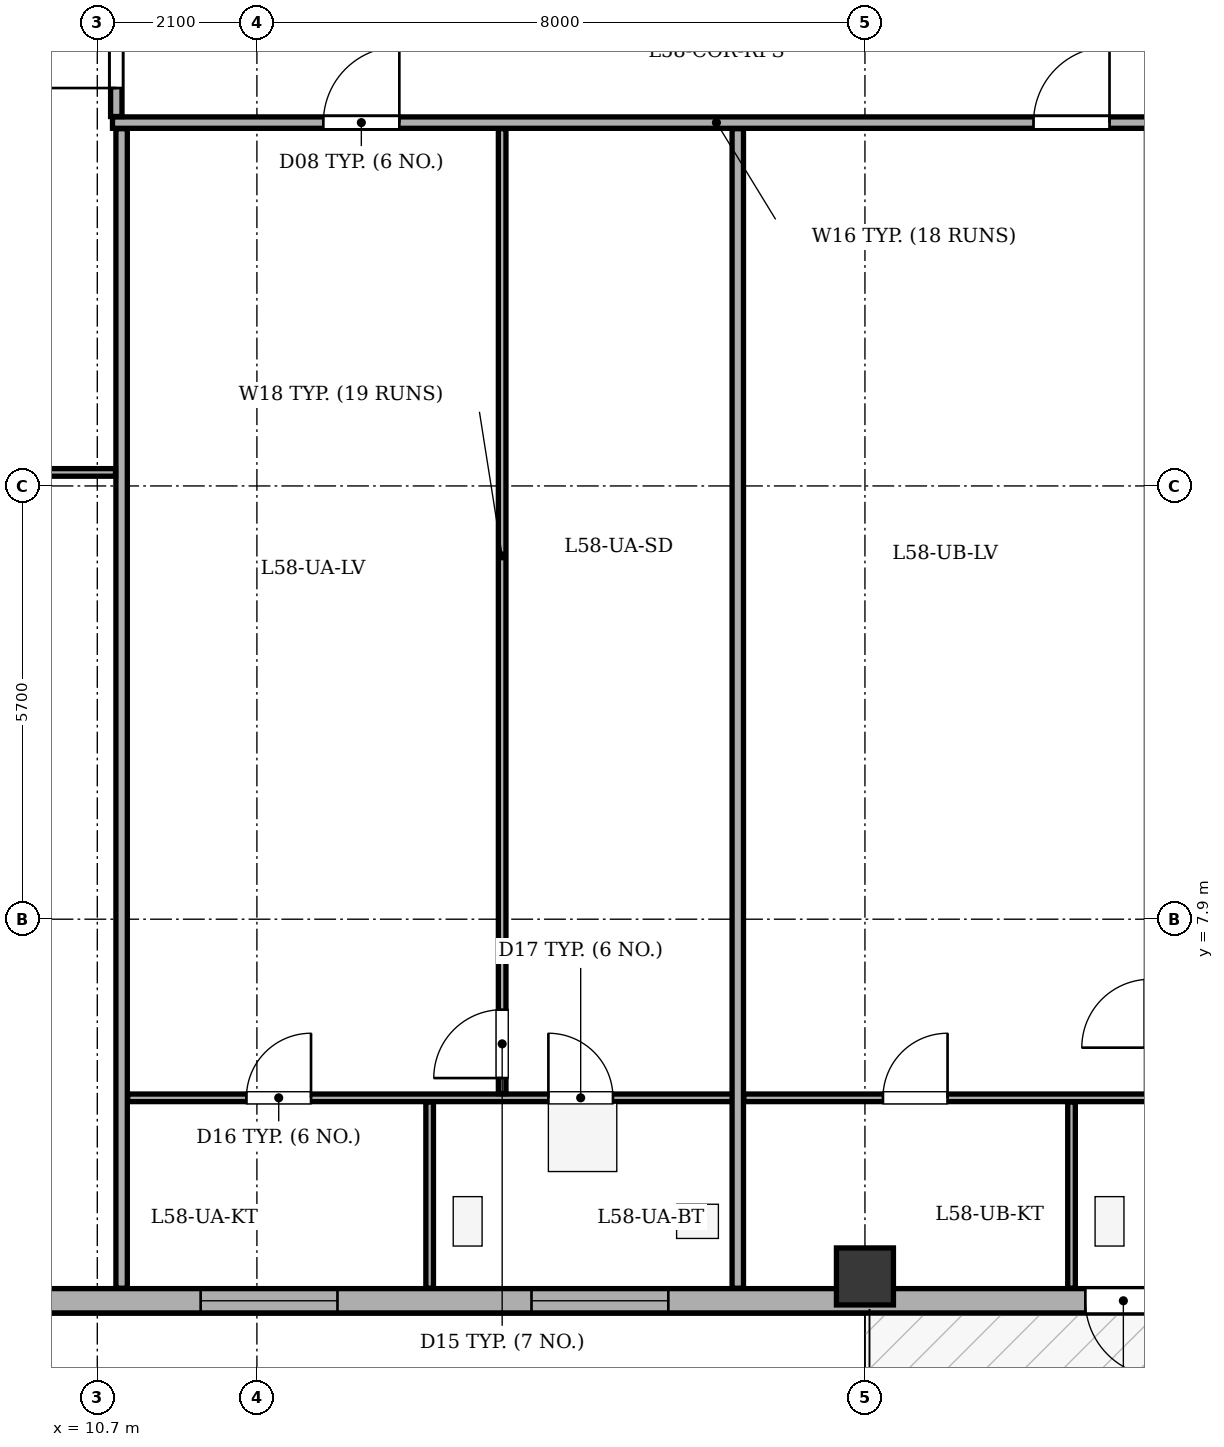
"""IFC4 building model, lengths in metres.
Left out: names, types, materials, properties, quantities, classifications, styles, units other than length and angle.
Written with IfcOpenShell. Run it as: python <this file> out.ifc"""

import sys

from ifc_helpers import new_model, si_unit, direction, frame, frame_2d, origin, origin_2d, place, context, subcontext, project, spatial, rectangle, extrude, element, fill, save


model = new_model("IFC4")
c1 = context("Model", 3, precision=1e-05, world=origin(), true_north=direction((0.0, 1.0)))
c2 = subcontext(c1, "Body", "Model", "MODEL_VIEW")
j1 = project(units=[si_unit("LENGTHUNIT", "METRE"), si_unit("PLANEANGLEUNIT", "RADIAN")], contexts=[c1])
p1 = place(None, origin())
s1 = spatial("IfcSite", under=j1, at=p1, CompositionType="ELEMENT")
p2 = place(p1, origin())
s2 = spatial("IfcBuilding", under=s1, at=p2, CompositionType="ELEMENT")
p3 = place(p2, frame((0.0, 0.0, 224.5)))
s3 = spatial("IfcBuildingStorey", under=s2, at=p3, CompositionType="ELEMENT", Elevation=224.5)
p4 = place(p3, frame((20.8, 3.2, 0.0), z_axis=(0.0, 0.0, 1.0), x_axis=(1.0, 0.0, 0.0)))
e1 = element("IfcColumn", 1, at=p4, inside=s3, PredefinedType="COLUMN", context=c2, shape_type="SweptSolid", body=[
    extrude(rectangle(XDim=0.75, YDim=0.75, at=origin_2d()), origin(), (0.0, 0.0, 1.0), 3.4),
])
p5 = place(p3, frame((44.8, 2.88, 0.0), z_axis=(0.0, 0.0, 1.0), x_axis=(-1.0, 0.0, 0.0)))
e2 = element("IfcWall", 2, at=p5, inside=s3, PredefinedType="STANDARD", context=c2, shape_type="SweptSolid", body=[
    extrude(rectangle(XDim=36.0, YDim=0.32, at=frame_2d((18.0, 0.0))), origin(), (0.0, 0.0, 1.0), 2.335),
])
p6 = place(p5, frame((20.1, 0.0, 0.0)))
e3 = element("IfcOpeningElement", 3, at=p6, cuts=e2, PredefinedType="OPENING", context=c2, shape_type="SweptSolid", body=[
    extrude(rectangle(XDim=1.0, YDim=2.02, at=frame_2d((0.5, 1.01))), frame((0.0, 0.17, 0.0), z_axis=(0.0, -1.0, 0.0), x_axis=(1.0, 0.0, 0.0)), (0.0, 0.0, 1.0), 0.34),
])
p7 = place(p5, frame((1.227, 0.0, 0.75)))
e4 = element("IfcOpeningElement", 4, at=p7, cuts=e2, PredefinedType="OPENING", context=c2, shape_type="SweptSolid", body=[
    extrude(rectangle(XDim=1.8, YDim=1.465, at=frame_2d((0.9, 0.732))), frame((0.0, 0.17, 0.0), z_axis=(0.0, -1.0, 0.0), x_axis=(1.0, 0.0, 0.0)), (0.0, 0.0, 1.0), 0.34),
])
p8 = place(p5, frame((5.18, 0.0, 0.75)))
e5 = element("IfcOpeningElement", 5, at=p8, cuts=e2, PredefinedType="OPENING", context=c2, shape_type="SweptSolid", body=[
    extrude(rectangle(XDim=1.8, YDim=1.465, at=frame_2d((0.9, 0.732))), frame((0.0, 0.17, 0.0), z_axis=(0.0, -1.0, 0.0), x_axis=(1.0, 0.0, 0.0)), (0.0, 0.0, 1.0), 0.34),
])
p9 = place(p5, frame((12.548, 0.0, 0.75)))
e6 = element("IfcOpeningElement", 6, at=p9, cuts=e2, PredefinedType="OPENING", context=c2, shape_type="SweptSolid", body=[
    extrude(rectangle(XDim=1.25, YDim=1.465, at=frame_2d((0.625, 0.732))), frame((0.0, 0.17, 0.0), z_axis=(0.0, -1.0, 0.0), x_axis=(1.0, 0.0, 0.0)), (0.0, 0.0, 1.0), 0.34),
])
p10 = place(p5, frame((26.587, 0.0, 0.75)))
e7 = element("IfcOpeningElement", 7, at=p10, cuts=e2, PredefinedType="OPENING", context=c2, shape_type="SweptSolid", body=[
    extrude(rectangle(XDim=1.8, YDim=1.465, at=frame_2d((0.9, 0.732))), frame((0.0, 0.17, 0.0), z_axis=(0.0, -1.0, 0.0), x_axis=(1.0, 0.0, 0.0)), (0.0, 0.0, 1.0), 0.34),
])
p11 = place(p5, frame((30.94, 0.0, 0.75)))
e8 = element("IfcOpeningElement", 8, at=p11, cuts=e2, PredefinedType="OPENING", context=c2, shape_type="SweptSolid", body=[
    extrude(rectangle(XDim=1.8, YDim=1.465, at=frame_2d((0.9, 0.732))), frame((0.0, 0.17, 0.0), z_axis=(0.0, -1.0, 0.0), x_axis=(1.0, 0.0, 0.0)), (0.0, 0.0, 1.0), 0.34),
])
p12 = place(p5, frame((10.33, 0.0, 0.75)))
e9 = element("IfcOpeningElement", 9, at=p12, cuts=e2, PredefinedType="OPENING", context=c2, shape_type="SweptSolid", body=[
    extrude(rectangle(XDim=0.75, YDim=1.45, at=frame_2d((0.375, 0.725))), frame((0.0, 0.17, 0.0), z_axis=(0.0, -1.0, 0.0), x_axis=(1.0, 0.0, 0.0)), (0.0, 0.0, 1.0), 0.34),
])
p13 = place(p3, frame((10.9, 18.38, 0.0), z_axis=(0.0, 0.0, 1.0), x_axis=(1.0, 0.0, 0.0)))
e10 = element("IfcWall", 10, at=p13, inside=s3, PredefinedType="PARTITIONING", context=c2, shape_type="SweptSolid", body=[
    extrude(rectangle(XDim=34.02, YDim=0.15, at=frame_2d((17.01, 0.0))), origin(), (0.0, 0.0, 1.0), 2.95),
])
p14 = place(p13, frame((2.774, 0.0, 0.0)))
e11 = element("IfcOpeningElement", 11, at=p14, cuts=e10, PredefinedType="OPENING", context=c2, shape_type="SweptSolid", body=[
    extrude(rectangle(XDim=1.0, YDim=2.1, at=frame_2d((0.5, 1.05))), frame((0.0, 0.085, 0.0), z_axis=(0.0, -1.0, 0.0), x_axis=(1.0, 0.0, 0.0)), (0.0, 0.0, 1.0), 0.17),
])
p15 = place(p13, frame((12.118, 0.0, 0.0)))
e12 = element("IfcOpeningElement", 12, at=p15, cuts=e10, PredefinedType="OPENING", context=c2, shape_type="SweptSolid", body=[
    extrude(rectangle(XDim=1.0, YDim=2.1, at=frame_2d((0.5, 1.05))), frame((0.0, 0.085, 0.0), z_axis=(0.0, -1.0, 0.0), x_axis=(1.0, 0.0, 0.0)), (0.0, 0.0, 1.0), 0.17),
])
p16 = place(p13, frame((20.901, 0.0, 0.0)))
e13 = element("IfcOpeningElement", 13, at=p16, cuts=e10, PredefinedType="OPENING", context=c2, shape_type="SweptSolid", body=[
    extrude(rectangle(XDim=1.0, YDim=2.1, at=frame_2d((0.5, 1.05))), frame((0.0, 0.085, 0.0), z_axis=(0.0, -1.0, 0.0), x_axis=(1.0, 0.0, 0.0)), (0.0, 0.0, 1.0), 0.17),
])
p17 = place(p13, frame((29.346, 0.0, 0.0)))
e14 = element("IfcOpeningElement", 14, at=p17, cuts=e10, PredefinedType="OPENING", context=c2, shape_type="SweptSolid", body=[
    extrude(rectangle(XDim=1.0, YDim=2.1, at=frame_2d((0.5, 1.05))), frame((0.0, 0.085, 0.0), z_axis=(0.0, -1.0, 0.0), x_axis=(1.0, 0.0, 0.0)), (0.0, 0.0, 1.0), 0.17),
])
p18 = place(p3, frame((11.02, 3.045, 0.0), z_axis=(0.0, 0.0, 1.0), x_axis=(0.0, 1.0, 0.0)))
e15 = element("IfcWall", 15, at=p18, inside=s3, PredefinedType="PARTITIONING", context=c2, shape_type="SweptSolid", body=[
    extrude(rectangle(XDim=15.255, YDim=0.15, at=frame_2d((7.627, 0.0))), origin(), (0.0, 0.0, 1.0), 2.335),
])
p19 = place(p3, frame((11.1, 5.55, 0.0), z_axis=(0.0, 0.0, 1.0), x_axis=(1.0, 0.0, 0.0)))
e16 = element("IfcWall", 16, at=p19, inside=s3, PredefinedType="PARTITIONING", context=c2, shape_type="SweptSolid", body=[
    extrude(rectangle(XDim=8.067, YDim=0.1, at=frame_2d((4.033, 0.0))), origin(), (0.0, 0.0, 1.0), 2.95),
])
p20 = place(p19, frame((1.562, 0.0, 0.0)))
e17 = element("IfcOpeningElement", 17, at=p20, cuts=e16, PredefinedType="OPENING", context=c2, shape_type="SweptSolid", body=[
    extrude(rectangle(XDim=0.85, YDim=2.05, at=frame_2d((0.425, 1.025))), frame((0.0, 0.06, 0.0), z_axis=(0.0, -1.0, 0.0), x_axis=(1.0, 0.0, 0.0)), (0.0, 0.0, 1.0), 0.12),
])
p21 = place(p19, frame((5.535, 0.0, 0.0)))
e18 = element("IfcOpeningElement", 18, at=p21, cuts=e16, PredefinedType="OPENING", context=c2, shape_type="SweptSolid", body=[
    extrude(rectangle(XDim=0.85, YDim=2.05, at=frame_2d((0.425, 1.025))), frame((0.0, 0.06, 0.0), z_axis=(0.0, -1.0, 0.0), x_axis=(1.0, 0.0, 0.0)), (0.0, 0.0, 1.0), 0.12),
])
p22 = place(p3, frame((16.027, 5.605, 0.0), z_axis=(0.0, 0.0, 1.0), x_axis=(0.0, 1.0, 0.0)))
e19 = element("IfcWall", 19, at=p22, inside=s3, PredefinedType="PARTITIONING", context=c2, shape_type="SweptSolid", body=[
    extrude(rectangle(XDim=12.695, YDim=0.1, at=frame_2d((6.348, 0.0))), origin(), (0.0, 0.0, 1.0), 2.95),
])
p23 = place(p22, frame((0.205, 0.0, 0.0)))
e20 = element("IfcOpeningElement", 20, at=p23, cuts=e19, PredefinedType="OPENING", context=c2, shape_type="SweptSolid", body=[
    extrude(rectangle(XDim=0.9, YDim=2.05, at=frame_2d((0.45, 1.025))), frame((0.0, 0.06, 0.0), z_axis=(0.0, -1.0, 0.0), x_axis=(1.0, 0.0, 0.0)), (0.0, 0.0, 1.0), 0.12),
])
p24 = place(p3, frame((15.073, 3.045, 0.0), z_axis=(0.0, 0.0, 1.0), x_axis=(0.0, 1.0, 0.0)))
e21 = element("IfcWall", 21, at=p24, inside=s3, PredefinedType="PARTITIONING", context=c2, shape_type="SweptSolid", body=[
    extrude(rectangle(XDim=2.45, YDim=0.1, at=frame_2d((1.225, 0.0))), origin(), (0.0, 0.0, 1.0), 1.535),
])
p25 = place(p3, frame((19.127, 3.045, 0.0), z_axis=(0.0, 0.0, 1.0), x_axis=(0.0, 1.0, 0.0)))
e22 = element("IfcWall", 22, at=p25, inside=s3, PredefinedType="PARTITIONING", context=c2, shape_type="SweptSolid", body=[
    extrude(rectangle(XDim=15.255, YDim=0.15, at=frame_2d((7.627, 0.0))), origin(), (0.0, 0.0, 1.0), 2.95),
])
p26 = place(p3, frame((19.207, 5.55, 0.0), z_axis=(0.0, 0.0, 1.0), x_axis=(1.0, 0.0, 0.0)))
e23 = element("IfcWall", 23, at=p26, inside=s3, PredefinedType="PARTITIONING", context=c2, shape_type="SweptSolid", body=[
    extrude(rectangle(XDim=8.743, YDim=0.1, at=frame_2d((4.372, 0.0))), origin(), (0.0, 0.0, 1.0), 2.95),
])
p27 = place(p26, frame((1.83, 0.0, 0.0)))
e24 = element("IfcOpeningElement", 24, at=p27, cuts=e23, PredefinedType="OPENING", context=c2, shape_type="SweptSolid", body=[
    extrude(rectangle(XDim=0.85, YDim=2.05, at=frame_2d((0.425, 1.025))), frame((0.0, 0.06, 0.0), z_axis=(0.0, -1.0, 0.0), x_axis=(1.0, 0.0, 0.0)), (0.0, 0.0, 1.0), 0.12),
])
p28 = place(p26, frame((6.042, 0.0, 0.0)))
e25 = element("IfcOpeningElement", 25, at=p28, cuts=e23, PredefinedType="OPENING", context=c2, shape_type="SweptSolid", body=[
    extrude(rectangle(XDim=0.85, YDim=2.05, at=frame_2d((0.425, 1.025))), frame((0.0, 0.06, 0.0), z_axis=(0.0, -1.0, 0.0), x_axis=(1.0, 0.0, 0.0)), (0.0, 0.0, 1.0), 0.12),
])
p29 = place(p3, frame((23.518, 3.045, 0.0), z_axis=(0.0, 0.0, 1.0), x_axis=(0.0, 1.0, 0.0)))
e26 = element("IfcWall", 26, at=p29, inside=s3, PredefinedType="PARTITIONING", context=c2, shape_type="SweptSolid", body=[
    extrude(rectangle(XDim=2.45, YDim=0.1, at=frame_2d((1.225, 0.0))), origin(), (0.0, 0.0, 1.0), 2.95),
])
p30 = place(p3, frame((10.95, 18.46, 0.0), z_axis=(0.0, 0.0, 1.0), x_axis=(0.0, 1.0, 0.0)))
e27 = element("IfcWall", 27, at=p30, inside=s3, PredefinedType="PARTITIONING", context=c2, shape_type="SweptSolid", body=[
    extrude(rectangle(XDim=1.79, YDim=0.15, at=frame_2d((0.895, 0.0))), origin(), (0.0, 0.0, 1.0), 2.335),
])
p31 = place(p30, frame((0.375, 0.0, 0.0)))
e28 = element("IfcOpeningElement", 28, at=p31, cuts=e27, PredefinedType="OPENING", context=c2, shape_type="SweptSolid", body=[
    extrude(rectangle(XDim=1.0, YDim=2.1, at=frame_2d((0.5, 1.05))), frame((0.0, 0.085, 0.0), z_axis=(0.0, -1.0, 0.0), x_axis=(1.0, 0.0, 0.0)), (0.0, 0.0, 1.0), 0.17),
])
p32 = place(p3, frame((4.645, 13.778, 0.0), z_axis=(0.0, 0.0, 1.0), x_axis=(1.0, 0.0, 0.0)))
e29 = element("IfcWall", 29, at=p32, inside=s3, PredefinedType="PARTITIONING", context=c2, shape_type="SweptSolid", body=[
    extrude(rectangle(XDim=6.295, YDim=0.1, at=frame_2d((3.147, 0.0))), origin(), (0.0, 0.0, 1.0), 2.95),
])
p33 = place(p32, frame((2.696, 0.0, 0.0)))
e30 = element("IfcOpeningElement", 30, at=p33, cuts=e29, PredefinedType="OPENING", context=c2, shape_type="SweptSolid", body=[
    extrude(rectangle(XDim=0.9, YDim=2.05, at=frame_2d((0.45, 1.025))), frame((0.0, 0.06, 0.0), z_axis=(0.0, -1.0, 0.0), x_axis=(1.0, 0.0, 0.0)), (0.0, 0.0, 1.0), 0.12),
])
p34 = place(p6, origin())
e31 = element("IfcDoor", 31, at=p34, inside=s3, OperationType="SINGLE_SWING_LEFT", PredefinedType="DOOR", context=c2, shape_type="SweptSolid", body=[
    extrude(rectangle(XDim=1.0, YDim=2.02, at=frame_2d((0.5, 1.01))), frame((0.0, 0.025, 0.0), z_axis=(0.0, -1.0, 0.0), x_axis=(1.0, 0.0, 0.0)), (0.0, 0.0, 1.0), 0.05),
])
fill(e3, e31)
p35 = place(p10, origin())
e32 = element("IfcWindow", 32, at=p35, inside=s3, PartitioningType="SINGLE_PANEL", PredefinedType="WINDOW", context=c2, shape_type="SweptSolid", body=[
    extrude(rectangle(XDim=1.8, YDim=1.465, at=frame_2d((0.9, 0.732))), frame((0.0, -0.01, 0.0), z_axis=(0.0, -1.0, 0.0), x_axis=(1.0, 0.0, 0.0)), (0.0, 0.0, 1.0), 0.06),
])
fill(e7, e32)
p36 = place(p11, origin())
e33 = element("IfcWindow", 33, at=p36, inside=s3, PartitioningType="SINGLE_PANEL", PredefinedType="WINDOW", context=c2, shape_type="SweptSolid", body=[
    extrude(rectangle(XDim=1.8, YDim=1.465, at=frame_2d((0.9, 0.732))), frame((0.0, -0.01, 0.0), z_axis=(0.0, -1.0, 0.0), x_axis=(1.0, 0.0, 0.0)), (0.0, 0.0, 1.0), 0.06),
])
fill(e8, e33)
p37 = place(p14, origin())
e34 = element("IfcDoor", 34, at=p37, inside=s3, OperationType="SINGLE_SWING_RIGHT", PredefinedType="DOOR", context=c2, shape_type="SweptSolid", body=[
    extrude(rectangle(XDim=1.0, YDim=2.1, at=frame_2d((0.5, 1.05))), frame((0.0, 0.025, 0.0), z_axis=(0.0, -1.0, 0.0), x_axis=(1.0, 0.0, 0.0)), (0.0, 0.0, 1.0), 0.05),
])
fill(e11, e34)
p38 = place(p15, origin())
e35 = element("IfcDoor", 35, at=p38, inside=s3, OperationType="SINGLE_SWING_RIGHT", PredefinedType="DOOR", context=c2, shape_type="SweptSolid", body=[
    extrude(rectangle(XDim=1.0, YDim=2.1, at=frame_2d((0.5, 1.05))), frame((0.0, 0.025, 0.0), z_axis=(0.0, -1.0, 0.0), x_axis=(1.0, 0.0, 0.0)), (0.0, 0.0, 1.0), 0.05),
])
fill(e12, e35)
p39 = place(p23, origin())
e36 = element("IfcDoor", 36, at=p39, inside=s3, OperationType="SINGLE_SWING_LEFT", PredefinedType="DOOR", context=c2, shape_type="SweptSolid", body=[
    extrude(rectangle(XDim=0.9, YDim=2.05, at=frame_2d((0.45, 1.025))), frame((0.0, 0.025, 0.0), z_axis=(0.0, -1.0, 0.0), x_axis=(1.0, 0.0, 0.0)), (0.0, 0.0, 1.0), 0.05),
])
fill(e20, e36)
p40 = place(p20, origin())
e37 = element("IfcDoor", 37, at=p40, inside=s3, OperationType="SINGLE_SWING_RIGHT", PredefinedType="DOOR", context=c2, shape_type="SweptSolid", body=[
    extrude(rectangle(XDim=0.85, YDim=2.05, at=frame_2d((0.425, 1.025))), frame((0.0, 0.025, 0.0), z_axis=(0.0, -1.0, 0.0), x_axis=(1.0, 0.0, 0.0)), (0.0, 0.0, 1.0), 0.05),
])
fill(e17, e37)
p41 = place(p21, origin())
e38 = element("IfcDoor", 38, at=p41, inside=s3, OperationType="SINGLE_SWING_LEFT", PredefinedType="DOOR", context=c2, shape_type="SweptSolid", body=[
    extrude(rectangle(XDim=0.85, YDim=2.05, at=frame_2d((0.425, 1.025))), frame((0.0, 0.025, 0.0), z_axis=(0.0, -1.0, 0.0), x_axis=(1.0, 0.0, 0.0)), (0.0, 0.0, 1.0), 0.05),
])
fill(e18, e38)
p42 = place(p27, origin())
e39 = element("IfcDoor", 39, at=p42, inside=s3, OperationType="SINGLE_SWING_RIGHT", PredefinedType="DOOR", context=c2, shape_type="SweptSolid", body=[
    extrude(rectangle(XDim=0.85, YDim=2.05, at=frame_2d((0.425, 1.025))), frame((0.0, 0.025, 0.0), z_axis=(0.0, -1.0, 0.0), x_axis=(1.0, 0.0, 0.0)), (0.0, 0.0, 1.0), 0.05),
])
fill(e24, e39)
p43 = place(p31, origin())
e40 = element("IfcDoor", 40, at=p43, inside=s3, OperationType="SINGLE_SWING_LEFT", PredefinedType="DOOR", context=c2, shape_type="SweptSolid", body=[
    extrude(rectangle(XDim=1.0, YDim=2.1, at=frame_2d((0.5, 1.05))), frame((0.0, 0.025, 0.0), z_axis=(0.0, -1.0, 0.0), x_axis=(1.0, 0.0, 0.0)), (0.0, 0.0, 1.0), 0.05),
])
fill(e28, e40)
save(model, sys.argv[1])
